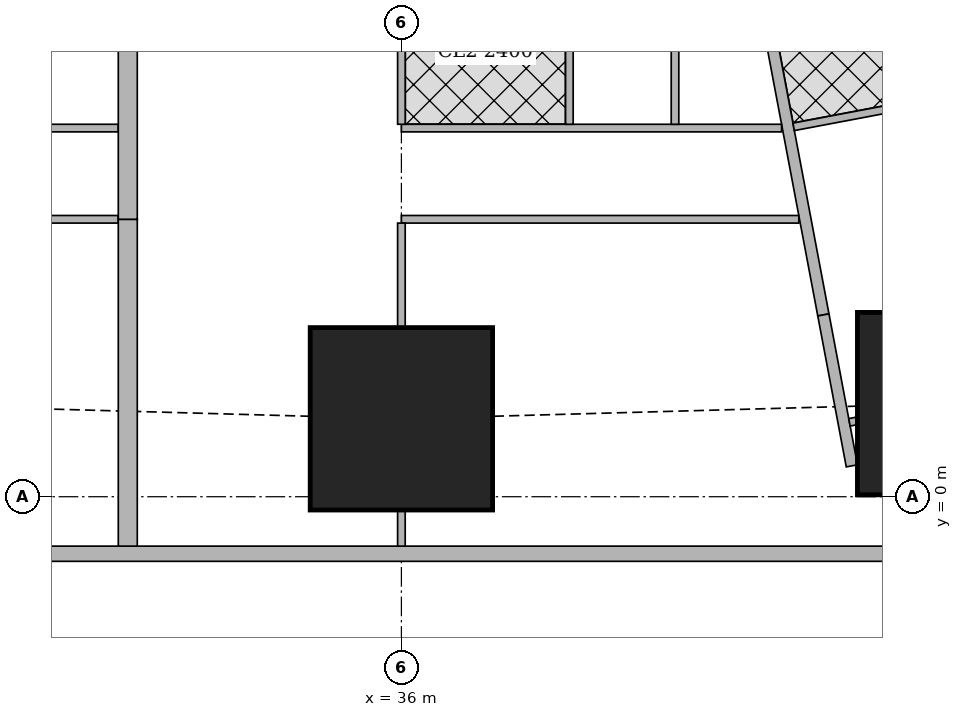
"""IFC4 building model, lengths in metres.
Left out: names, types, materials, properties, quantities, classifications, styles, units other than length and angle.
Written with IfcOpenShell. Run it as: python <this file> out.ifc"""

import sys

from ifc_helpers import new_model, si_unit, direction, frame, frame_2d, origin, origin_2d, place, context, subcontext, project, spatial, rectangle, extrude, element, fill, save


model = new_model("IFC4")
c1 = context("Model", 3, precision=1e-05, world=origin(), true_north=direction((0.0, 1.0)))
c2 = subcontext(c1, "Body", "Model", "MODEL_VIEW")
j1 = project(units=[si_unit("LENGTHUNIT", "METRE"), si_unit("PLANEANGLEUNIT", "RADIAN")], contexts=[c1])
p1 = place(None, origin())
s1 = spatial("IfcSite", under=j1, at=p1, CompositionType="ELEMENT")
p2 = place(p1, origin())
s2 = spatial("IfcBuilding", under=s1, at=p2, CompositionType="ELEMENT")
p3 = place(p2, frame((0.0, 0.0, 234.95)))
s3 = spatial("IfcBuildingStorey", under=s2, at=p3, CompositionType="ELEMENT", Elevation=234.95)
for number, where, z_axis, x_axis in (
    (1, (36.0, 1.025, 0.0), (0.0, 0.0, 1.0), (1.0, 0.0, 0.0)),
    (2, (43.2, 1.225, 0.0), (0.0, 0.0, 1.0), (1.0, 0.0, 0.0)),
):
    element("IfcColumn", number, at=place(p3, frame(where, z_axis=z_axis, x_axis=x_axis)), inside=s3, PredefinedType="COLUMN", context=c2, shape_type="SweptSolid", body=[
        extrude(rectangle(XDim=2.4, YDim=2.4, at=origin_2d()), origin(), (0.0, 0.0, 1.0), 3.75),
    ])
p4 = place(p3, frame((14.563, -0.75, 0.0), z_axis=(0.0, 0.0, 1.0), x_axis=(1.0, 0.0, 0.0)))
e3 = element("IfcWall", 3, at=p4, inside=s3, PredefinedType="SOLIDWALL", context=c2, shape_type="SweptSolid", body=[
    extrude(rectangle(XDim=33.228, YDim=0.2, at=frame_2d((16.614, 0.0))), origin(), (0.0, 0.0, 1.0), 3.5),
])
p5 = place(p4, frame((2.319, 0.0, 0.9)))
e4 = element("IfcOpeningElement", 4, at=p5, cuts=e3, PredefinedType="OPENING", context=c2, shape_type="SweptSolid", body=[
    extrude(rectangle(XDim=2.4, YDim=1.5, at=frame_2d((1.2, 0.75))), frame((0.0, 0.11, 0.0), z_axis=(0.0, -1.0, 0.0), x_axis=(1.0, 0.0, 0.0)), (0.0, 0.0, 1.0), 0.22),
])
p6 = place(p4, frame((7.937, 0.0, 0.9)))
e5 = element("IfcOpeningElement", 5, at=p6, cuts=e3, PredefinedType="OPENING", context=c2, shape_type="SweptSolid", body=[
    extrude(rectangle(XDim=1.8, YDim=1.5, at=frame_2d((0.9, 0.75))), frame((0.0, 0.11, 0.0), z_axis=(0.0, -1.0, 0.0), x_axis=(1.0, 0.0, 0.0)), (0.0, 0.0, 1.0), 0.22),
])
p7 = place(p4, frame((11.537, 0.0, 0.9)))
e6 = element("IfcOpeningElement", 6, at=p7, cuts=e3, PredefinedType="OPENING", context=c2, shape_type="SweptSolid", body=[
    extrude(rectangle(XDim=1.8, YDim=1.5, at=frame_2d((0.9, 0.75))), frame((0.0, 0.11, 0.0), z_axis=(0.0, -1.0, 0.0), x_axis=(1.0, 0.0, 0.0)), (0.0, 0.0, 1.0), 0.22),
])
p8 = place(p4, frame((15.137, 0.0, 0.9)))
e7 = element("IfcOpeningElement", 7, at=p8, cuts=e3, PredefinedType="OPENING", context=c2, shape_type="SweptSolid", body=[
    extrude(rectangle(XDim=1.8, YDim=1.5, at=frame_2d((0.9, 0.75))), frame((0.0, 0.11, 0.0), z_axis=(0.0, -1.0, 0.0), x_axis=(1.0, 0.0, 0.0)), (0.0, 0.0, 1.0), 0.22),
])
p9 = place(p4, frame((18.737, 0.0, 0.9)))
e8 = element("IfcOpeningElement", 8, at=p9, cuts=e3, PredefinedType="OPENING", context=c2, shape_type="SweptSolid", body=[
    extrude(rectangle(XDim=1.8, YDim=1.5, at=frame_2d((0.9, 0.75))), frame((0.0, 0.11, 0.0), z_axis=(0.0, -1.0, 0.0), x_axis=(1.0, 0.0, 0.0)), (0.0, 0.0, 1.0), 0.22),
])
p10 = place(p4, frame((22.337, 0.0, 0.9)))
e9 = element("IfcOpeningElement", 9, at=p10, cuts=e3, PredefinedType="OPENING", context=c2, shape_type="SweptSolid", body=[
    extrude(rectangle(XDim=1.8, YDim=1.5, at=frame_2d((0.9, 0.75))), frame((0.0, 0.11, 0.0), z_axis=(0.0, -1.0, 0.0), x_axis=(1.0, 0.0, 0.0)), (0.0, 0.0, 1.0), 0.22),
])
p11 = place(p4, frame((25.937, 0.0, 0.9)))
e10 = element("IfcOpeningElement", 10, at=p11, cuts=e3, PredefinedType="OPENING", context=c2, shape_type="SweptSolid", body=[
    extrude(rectangle(XDim=1.8, YDim=1.5, at=frame_2d((0.9, 0.75))), frame((0.0, 0.11, 0.0), z_axis=(0.0, -1.0, 0.0), x_axis=(1.0, 0.0, 0.0)), (0.0, 0.0, 1.0), 0.22),
])
p12 = place(p3, frame((33.933, 42.73, 0.0), z_axis=(0.0, 0.0, 1.0), x_axis=(0.185595417643, -0.982626246825, 0.0)))
e11 = element("IfcWall", 11, at=p12, inside=s3, PredefinedType="SOLIDWALL", context=c2, shape_type="SweptSolid", body=[
    extrude(rectangle(XDim=41.051, YDim=0.15, at=frame_2d((20.525, 0.0))), origin(), (0.0, 0.0, 1.0), 2.5),
])
p13 = place(p12, frame((12.266, 0.0, 0.0)))
e12 = element("IfcOpeningElement", 12, at=p13, cuts=e11, PredefinedType="OPENING", context=c2, shape_type="SweptSolid", body=[
    extrude(rectangle(XDim=1.0, YDim=2.1, at=frame_2d((0.5, 1.05))), frame((0.0, 0.085, 0.0), z_axis=(0.0, -1.0, 0.0), x_axis=(1.0, 0.0, 0.0)), (0.0, 0.0, 1.0), 0.17),
])
p14 = place(p12, frame((16.082, 0.0, 0.0)))
e13 = element("IfcOpeningElement", 13, at=p14, cuts=e11, PredefinedType="OPENING", context=c2, shape_type="SweptSolid", body=[
    extrude(rectangle(XDim=1.0, YDim=2.1, at=frame_2d((0.5, 1.05))), frame((0.0, 0.085, 0.0), z_axis=(0.0, -1.0, 0.0), x_axis=(1.0, 0.0, 0.0)), (0.0, 0.0, 1.0), 0.17),
])
p15 = place(p12, frame((30.862, 0.0, 0.0)))
e14 = element("IfcOpeningElement", 14, at=p15, cuts=e11, PredefinedType="OPENING", context=c2, shape_type="SweptSolid", body=[
    extrude(rectangle(XDim=1.0, YDim=2.1, at=frame_2d((0.5, 1.05))), frame((0.0, 0.085, 0.0), z_axis=(0.0, -1.0, 0.0), x_axis=(1.0, 0.0, 0.0)), (0.0, 0.0, 1.0), 0.17),
])
p16 = place(p3, frame((41.552, 2.392, 0.0), z_axis=(0.0, 0.0, 1.0), x_axis=(0.185535500323, -0.982637561932, 0.0)))
e15 = element("IfcWall", 15, at=p16, inside=s3, PredefinedType="SOLIDWALL", context=c2, shape_type="SweptSolid", body=[
    extrude(rectangle(XDim=2.021, YDim=0.15, at=frame_2d((1.011, 0.0))), origin(), (0.0, 0.0, 1.0), 2.05),
])
p17 = place(p3, frame((32.275, 3.65, 0.0), z_axis=(0.0, 0.0, 1.0), x_axis=(-1.0, 0.0, 0.0)))
e16 = element("IfcWall", 16, at=p17, inside=s3, PredefinedType="PARTITIONING", context=c2, shape_type="SweptSolid", body=[
    extrude(rectangle(XDim=7.075, YDim=0.1, at=frame_2d((3.538, 0.0))), origin(), (0.0, 0.0, 1.0), 3.5),
])
p18 = place(p17, frame((5.975, 0.0, 0.0)))
e17 = element("IfcOpeningElement", 17, at=p18, cuts=e16, PredefinedType="OPENING", context=c2, shape_type="SweptSolid", body=[
    extrude(rectangle(XDim=0.9, YDim=2.1, at=frame_2d((0.45, 1.05))), frame((0.0, 0.06, 0.0), z_axis=(0.0, -1.0, 0.0), x_axis=(1.0, 0.0, 0.0)), (0.0, 0.0, 1.0), 0.12),
])
p19 = place(p17, frame((1.35, 0.0, 0.0)))
e18 = element("IfcOpeningElement", 18, at=p19, cuts=e16, PredefinedType="OPENING", context=c2, shape_type="SweptSolid", body=[
    extrude(rectangle(XDim=0.9, YDim=2.1, at=frame_2d((0.45, 1.05))), frame((0.0, 0.06, 0.0), z_axis=(0.0, -1.0, 0.0), x_axis=(1.0, 0.0, 0.0)), (0.0, 0.0, 1.0), 0.12),
])
p20 = place(p3, frame((32.275, 4.85, 0.0), z_axis=(0.0, 0.0, 1.0), x_axis=(-1.0, 0.0, 0.0)))
e19 = element("IfcWall", 19, at=p20, inside=s3, PredefinedType="PARTITIONING", context=c2, shape_type="SweptSolid", body=[
    extrude(rectangle(XDim=7.075, YDim=0.1, at=frame_2d((3.538, 0.0))), origin(), (0.0, 0.0, 1.0), 3.5),
])
p21 = place(p20, frame((5.52, 0.0, 0.0)))
e20 = element("IfcOpeningElement", 20, at=p21, cuts=e19, PredefinedType="OPENING", context=c2, shape_type="SweptSolid", body=[
    extrude(rectangle(XDim=0.9, YDim=2.1, at=frame_2d((0.45, 1.05))), frame((0.0, 0.06, 0.0), z_axis=(0.0, -1.0, 0.0), x_axis=(1.0, 0.0, 0.0)), (0.0, 0.0, 1.0), 0.12),
])
p22 = place(p20, frame((2.225, 0.0, 0.0)))
e21 = element("IfcOpeningElement", 21, at=p22, cuts=e19, PredefinedType="OPENING", context=c2, shape_type="SweptSolid", body=[
    extrude(rectangle(XDim=0.9, YDim=2.1, at=frame_2d((0.45, 1.05))), frame((0.0, 0.06, 0.0), z_axis=(0.0, -1.0, 0.0), x_axis=(1.0, 0.0, 0.0)), (0.0, 0.0, 1.0), 0.12),
])
p23 = place(p20, frame((3.72, 0.0, 0.0)))
e22 = element("IfcOpeningElement", 22, at=p23, cuts=e19, PredefinedType="OPENING", context=c2, shape_type="SweptSolid", body=[
    extrude(rectangle(XDim=0.9, YDim=2.1, at=frame_2d((0.45, 1.05))), frame((0.0, 0.06, 0.0), z_axis=(0.0, -1.0, 0.0), x_axis=(1.0, 0.0, 0.0)), (0.0, 0.0, 1.0), 0.12),
])
p24 = place(p20, frame((0.425, 0.0, 0.0)))
e23 = element("IfcOpeningElement", 23, at=p24, cuts=e19, PredefinedType="OPENING", context=c2, shape_type="SweptSolid", body=[
    extrude(rectangle(XDim=0.9, YDim=2.1, at=frame_2d((0.45, 1.05))), frame((0.0, 0.06, 0.0), z_axis=(0.0, -1.0, 0.0), x_axis=(1.0, 0.0, 0.0)), (0.0, 0.0, 1.0), 0.12),
])
p25 = place(p3, frame((41.229, 3.65, 0.0), z_axis=(0.0, 0.0, 1.0), x_axis=(-1.0, 0.0, 0.0)))
e24 = element("IfcWall", 24, at=p25, inside=s3, PredefinedType="PARTITIONING", context=c2, shape_type="SweptSolid", body=[
    extrude(rectangle(XDim=5.229, YDim=0.1, at=frame_2d((2.615, 0.0))), origin(), (0.0, 0.0, 1.0), 3.5),
])
p26 = place(p25, frame((4.129, 0.0, 0.0)))
e25 = element("IfcOpeningElement", 25, at=p26, cuts=e24, PredefinedType="OPENING", context=c2, shape_type="SweptSolid", body=[
    extrude(rectangle(XDim=0.9, YDim=2.1, at=frame_2d((0.45, 1.05))), frame((0.0, 0.06, 0.0), z_axis=(0.0, -1.0, 0.0), x_axis=(1.0, 0.0, 0.0)), (0.0, 0.0, 1.0), 0.12),
])
p27 = place(p3, frame((41.002, 4.85, 0.0), z_axis=(0.0, 0.0, 1.0), x_axis=(-1.0, 0.0, 0.0)))
e26 = element("IfcWall", 26, at=p27, inside=s3, PredefinedType="PARTITIONING", context=c2, shape_type="SweptSolid", body=[
    extrude(rectangle(XDim=5.002, YDim=0.1, at=frame_2d((2.501, 0.0))), origin(), (0.0, 0.0, 1.0), 3.5),
])
p28 = place(p27, frame((3.447, 0.0, 0.0)))
e27 = element("IfcOpeningElement", 27, at=p28, cuts=e26, PredefinedType="OPENING", context=c2, shape_type="SweptSolid", body=[
    extrude(rectangle(XDim=0.9, YDim=2.1, at=frame_2d((0.45, 1.05))), frame((0.0, 0.06, 0.0), z_axis=(0.0, -1.0, 0.0), x_axis=(1.0, 0.0, 0.0)), (0.0, 0.0, 1.0), 0.12),
])
p29 = place(p27, frame((0.15, 0.0, 0.0)))
e28 = element("IfcOpeningElement", 28, at=p29, cuts=e26, PredefinedType="OPENING", context=c2, shape_type="SweptSolid", body=[
    extrude(rectangle(XDim=0.9, YDim=2.1, at=frame_2d((0.45, 1.05))), frame((0.0, 0.06, 0.0), z_axis=(0.0, -1.0, 0.0), x_axis=(1.0, 0.0, 0.0)), (0.0, 0.0, 1.0), 0.12),
])
p30 = place(p27, frame((1.647, 0.0, 0.0)))
e29 = element("IfcOpeningElement", 29, at=p30, cuts=e26, PredefinedType="OPENING", context=c2, shape_type="SweptSolid", body=[
    extrude(rectangle(XDim=0.9, YDim=2.1, at=frame_2d((0.45, 1.05))), frame((0.0, 0.06, 0.0), z_axis=(0.0, -1.0, 0.0), x_axis=(1.0, 0.0, 0.0)), (0.0, 0.0, 1.0), 0.12),
])
p31 = place(p3, frame((36.0, -0.65, 0.0), z_axis=(0.0, 0.0, 1.0), x_axis=(0.0, 1.0, 0.0)))
e30 = element("IfcWall", 30, at=p31, inside=s3, PredefinedType="PARTITIONING", context=c2, shape_type="SweptSolid", body=[
    extrude(rectangle(XDim=0.474, YDim=0.1, at=frame_2d((0.237, 0.0))), origin(), (0.0, 0.0, 1.0), 3.5),
])
p32 = place(p3, frame((36.0, 2.226, 0.0), z_axis=(0.0, 0.0, 1.0), x_axis=(0.0, 1.0, 0.0)))
e31 = element("IfcWall", 31, at=p32, inside=s3, PredefinedType="PARTITIONING", context=c2, shape_type="SweptSolid", body=[
    extrude(rectangle(XDim=1.374, YDim=0.1, at=frame_2d((0.687, 0.0))), origin(), (0.0, 0.0, 1.0), 3.5),
])
p33 = place(p3, frame((36.0, 4.9, 0.0), z_axis=(0.0, 0.0, 1.0), x_axis=(0.0, 1.0, 0.0)))
e32 = element("IfcWall", 32, at=p33, inside=s3, PredefinedType="PARTITIONING", context=c2, shape_type="SweptSolid", body=[
    extrude(rectangle(XDim=1.899, YDim=0.1, at=frame_2d((0.95, 0.0))), origin(), (0.0, 0.0, 1.0), 3.5),
])
for number, where, z_axis, x_axis in (
    (33, (39.6, 4.9, 0.0), (0.0, 0.0, 1.0), (0.0, 1.0, 0.0)),
    (34, (38.21, 4.9, 0.0), (0.0, 0.0, 1.0), (0.0, 1.0, 0.0)),
):
    element("IfcWall", number, at=place(p3, frame(where, z_axis=z_axis, x_axis=x_axis)), inside=s3, PredefinedType="PARTITIONING", context=c2, shape_type="SweptSolid", body=[
        extrude(rectangle(XDim=3.275, YDim=0.1, at=frame_2d((1.638, 0.0))), origin(), (0.0, 0.0, 1.0), 3.5),
    ])
p34 = place(p3, frame((32.4, -0.65, 0.0), z_axis=(0.0, 0.0, 1.0), x_axis=(0.0, 1.0, 0.0)))
e35 = element("IfcWall", 35, at=p34, inside=s3, PredefinedType="SOLIDWALL", context=c2, shape_type="SweptSolid", body=[
    extrude(rectangle(XDim=4.3, YDim=0.25, at=frame_2d((2.15, 0.0))), origin(), (0.0, 0.0, 1.0), 2.05),
])
p35 = place(p3, frame((32.4, 3.65, 0.0), z_axis=(0.0, 0.0, 1.0), x_axis=(0.0, 1.0, 0.0)))
e36 = element("IfcWall", 36, at=p35, inside=s3, PredefinedType="SOLIDWALL", context=c2, shape_type="SweptSolid", body=[
    extrude(rectangle(XDim=4.525, YDim=0.25, at=frame_2d((2.263, 0.0))), origin(), (0.0, 0.0, 1.0), 3.5),
])
p36 = place(p3, frame((41.99, 0.997, 0.0), z_axis=(0.0, 0.0, 1.0), x_axis=(-0.982382747416, -0.186880008506, 0.0)))
e37 = element("IfcWall", 37, at=p36, inside=s3, PredefinedType="PARTITIONING", context=c2, shape_type="SweptSolid", body=[
    extrude(rectangle(XDim=0.097, YDim=0.1, at=frame_2d((0.048, 0.0))), origin(), (0.0, 0.0, 1.0), 2.05),
])
p37 = place(p3, frame((44.379, 5.474, 0.0), z_axis=(0.0, 0.0, 1.0), x_axis=(-0.982607026909, -0.185697147715, 0.0)))
e38 = element("IfcWall", 38, at=p37, inside=s3, PredefinedType="PARTITIONING", context=c2, shape_type="SweptSolid", body=[
    extrude(rectangle(XDim=3.275, YDim=0.1, at=frame_2d((1.637, 0.0))), origin(), (0.0, 0.0, 1.0), 3.5),
])
p38 = place(p8, origin())
e39 = element("IfcWindow", 39, at=p38, inside=s3, PartitioningType="SINGLE_PANEL", PredefinedType="WINDOW", context=c2, shape_type="SweptSolid", body=[
    extrude(rectangle(XDim=1.8, YDim=1.5, at=frame_2d((0.9, 0.75))), frame((0.0, 0.03, 0.0), z_axis=(0.0, -1.0, 0.0), x_axis=(1.0, 0.0, 0.0)), (0.0, 0.0, 1.0), 0.06),
])
fill(e7, e39)
p39 = place(p9, origin())
e40 = element("IfcWindow", 40, at=p39, inside=s3, PartitioningType="SINGLE_PANEL", PredefinedType="WINDOW", context=c2, shape_type="SweptSolid", body=[
    extrude(rectangle(XDim=1.8, YDim=1.5, at=frame_2d((0.9, 0.75))), frame((0.0, 0.03, 0.0), z_axis=(0.0, -1.0, 0.0), x_axis=(1.0, 0.0, 0.0)), (0.0, 0.0, 1.0), 0.06),
])
fill(e8, e40)
p40 = place(p10, origin())
e41 = element("IfcWindow", 41, at=p40, inside=s3, PartitioningType="SINGLE_PANEL", PredefinedType="WINDOW", context=c2, shape_type="SweptSolid", body=[
    extrude(rectangle(XDim=1.8, YDim=1.5, at=frame_2d((0.9, 0.75))), frame((0.0, 0.03, 0.0), z_axis=(0.0, -1.0, 0.0), x_axis=(1.0, 0.0, 0.0)), (0.0, 0.0, 1.0), 0.06),
])
fill(e9, e41)
p41 = place(p11, origin())
e42 = element("IfcWindow", 42, at=p41, inside=s3, PartitioningType="SINGLE_PANEL", PredefinedType="WINDOW", context=c2, shape_type="SweptSolid", body=[
    extrude(rectangle(XDim=1.8, YDim=1.5, at=frame_2d((0.9, 0.75))), frame((0.0, 0.03, 0.0), z_axis=(0.0, -1.0, 0.0), x_axis=(1.0, 0.0, 0.0)), (0.0, 0.0, 1.0), 0.06),
])
fill(e10, e42)
p42 = place(p24, origin())
e43 = element("IfcDoor", 43, at=p42, inside=s3, OperationType="SINGLE_SWING_RIGHT", PredefinedType="DOOR", context=c2, shape_type="SweptSolid", body=[
    extrude(rectangle(XDim=0.9, YDim=2.1, at=frame_2d((0.45, 1.05))), frame((0.0, 0.025, 0.0), z_axis=(0.0, -1.0, 0.0), x_axis=(1.0, 0.0, 0.0)), (0.0, 0.0, 1.0), 0.05),
])
fill(e23, e43)
p43 = place(p26, origin())
e44 = element("IfcDoor", 44, at=p43, inside=s3, OperationType="SINGLE_SWING_LEFT", PredefinedType="DOOR", context=c2, shape_type="SweptSolid", body=[
    extrude(rectangle(XDim=0.9, YDim=2.1, at=frame_2d((0.45, 1.05))), frame((0.0, 0.025, 0.0), z_axis=(0.0, -1.0, 0.0), x_axis=(1.0, 0.0, 0.0)), (0.0, 0.0, 1.0), 0.05),
])
fill(e25, e44)
p44 = place(p28, origin())
e45 = element("IfcDoor", 45, at=p44, inside=s3, OperationType="SINGLE_SWING_LEFT", PredefinedType="DOOR", context=c2, shape_type="SweptSolid", body=[
    extrude(rectangle(XDim=0.9, YDim=2.1, at=frame_2d((0.45, 1.05))), frame((0.0, 0.025, 0.0), z_axis=(0.0, -1.0, 0.0), x_axis=(1.0, 0.0, 0.0)), (0.0, 0.0, 1.0), 0.05),
])
fill(e27, e45)
p45 = place(p29, origin())
e46 = element("IfcDoor", 46, at=p45, inside=s3, OperationType="SINGLE_SWING_RIGHT", PredefinedType="DOOR", context=c2, shape_type="SweptSolid", body=[
    extrude(rectangle(XDim=0.9, YDim=2.1, at=frame_2d((0.45, 1.05))), frame((0.0, 0.025, 0.0), z_axis=(0.0, -1.0, 0.0), x_axis=(1.0, 0.0, 0.0)), (0.0, 0.0, 1.0), 0.05),
])
fill(e28, e46)
p46 = place(p30, origin())
e47 = element("IfcDoor", 47, at=p46, inside=s3, OperationType="SINGLE_SWING_LEFT", PredefinedType="DOOR", context=c2, shape_type="SweptSolid", body=[
    extrude(rectangle(XDim=0.9, YDim=2.1, at=frame_2d((0.45, 1.05))), frame((0.0, 0.025, 0.0), z_axis=(0.0, -1.0, 0.0), x_axis=(1.0, 0.0, 0.0)), (0.0, 0.0, 1.0), 0.05),
])
fill(e29, e47)
save(model, sys.argv[1])
